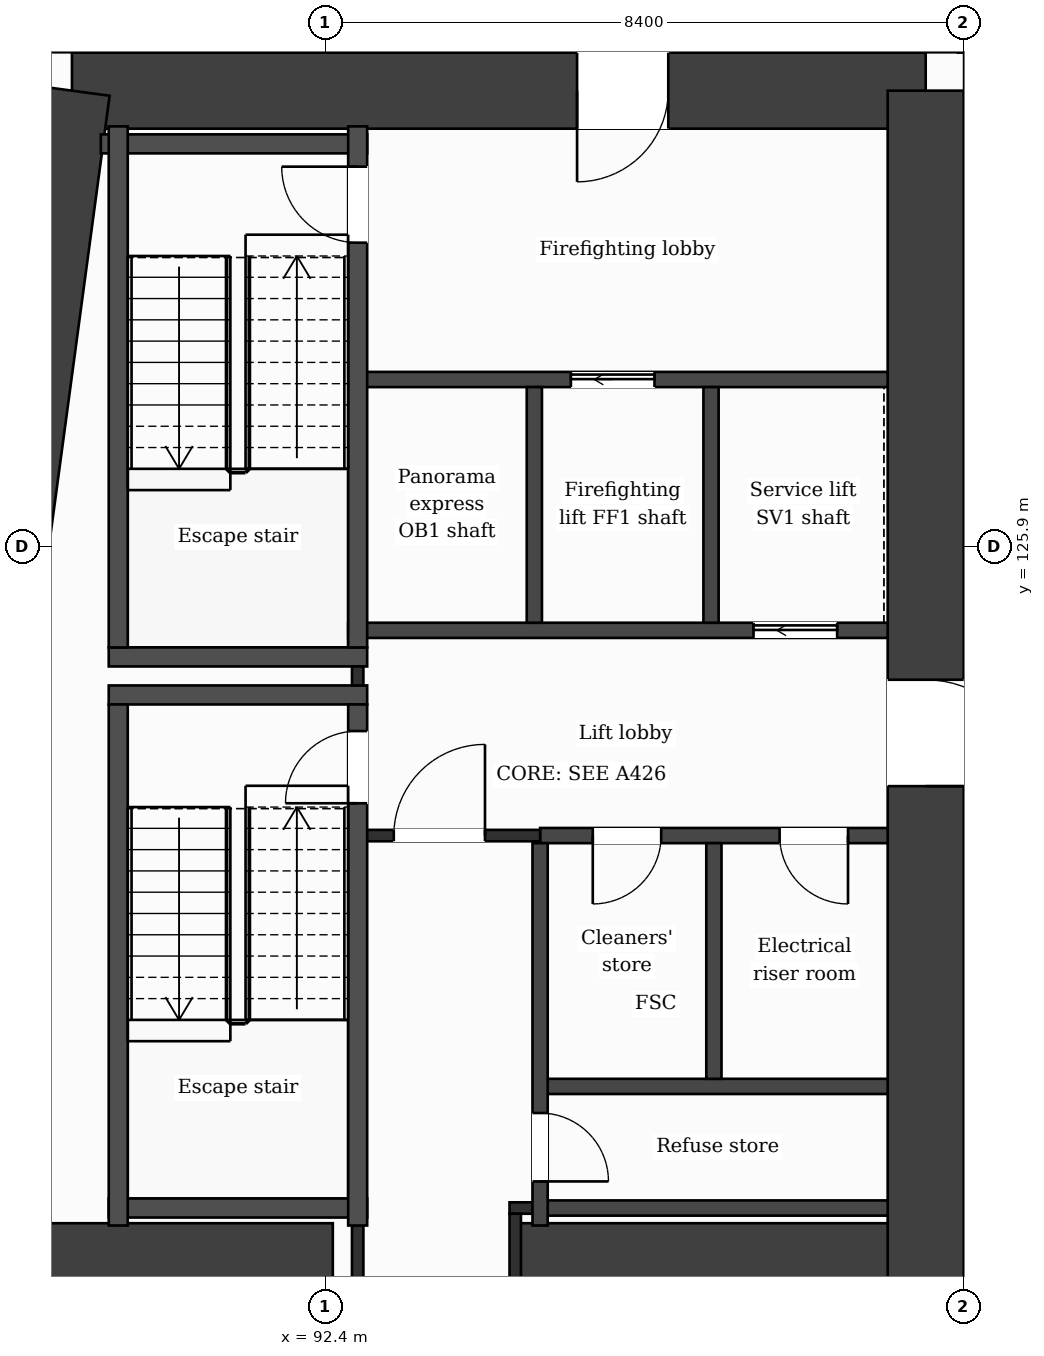
"""IFC4 building model, lengths in metres.
Left out: names, types, materials, properties, quantities, classifications, styles, units other than length and angle.
Written with IfcOpenShell. Run it as: python <this file> out.ifc"""

import sys

from ifc_helpers import new_model, si_unit, direction, frame, frame_2d, origin, place, context, subcontext, project, spatial, rectangle, extrude, element, fill, save


model = new_model("IFC4")
c1 = context("Model", 3, precision=1e-05, world=origin(), true_north=direction((0.0, 1.0)))
c2 = subcontext(c1, "Body", "Model", "MODEL_VIEW")
j1 = project(units=[si_unit("LENGTHUNIT", "METRE"), si_unit("PLANEANGLEUNIT", "RADIAN")], contexts=[c1])
p1 = place(None, origin())
s1 = spatial("IfcSite", under=j1, at=p1, CompositionType="ELEMENT")
p2 = place(p1, origin())
s2 = spatial("IfcBuilding", under=s1, at=p2, CompositionType="ELEMENT")
p3 = place(p2, frame((0.0, 0.0, 109.5)))
s3 = spatial("IfcBuildingStorey", under=s2, at=p3, CompositionType="ELEMENT", Elevation=109.5)
p4 = place(p3, frame((89.068, 131.9, 0.0), z_axis=(0.0, 0.0, 1.0), x_axis=(1.0, 0.0, 0.0)))
e1 = element("IfcWall", 1, at=p4, inside=s3, PredefinedType="SHEAR", context=c2, shape_type="SweptSolid", body=[
    extrude(rectangle(XDim=11.232, YDim=1.0, at=frame_2d((5.616, 0.0))), origin(), (0.0, 0.0, 1.0), 3.7),
])
p5 = place(p4, frame((6.646, 0.0, 0.0)))
e2 = element("IfcOpeningElement", 2, at=p5, cuts=e1, PredefinedType="OPENING", context=c2, shape_type="SweptSolid", body=[
    extrude(rectangle(XDim=1.2, YDim=2.1, at=frame_2d((0.6, 1.05))), frame((0.0, 0.51, 0.0), z_axis=(0.0, -1.0, 0.0), x_axis=(1.0, 0.0, 0.0)), (0.0, 0.0, 1.0), 1.02),
])
p6 = place(p3, frame((100.3, 131.9, 0.0), z_axis=(0.0, 0.0, 1.0), x_axis=(0.0, -1.0, 0.0)))
e3 = element("IfcWall", 3, at=p6, inside=s3, PredefinedType="SHEAR", context=c2, shape_type="SweptSolid", body=[
    extrude(rectangle(XDim=21.0, YDim=1.0, at=frame_2d((10.5, 0.0))), origin(), (0.0, 0.0, 1.0), 3.7),
])
p7 = place(p6, frame((7.75, 0.0, 0.0)))
e4 = element("IfcOpeningElement", 4, at=p7, cuts=e3, PredefinedType="OPENING", context=c2, shape_type="SweptSolid", body=[
    extrude(rectangle(XDim=1.4, YDim=2.1, at=frame_2d((0.7, 1.05))), frame((0.0, 0.51, 0.0), z_axis=(0.0, -1.0, 0.0), x_axis=(1.0, 0.0, 0.0)), (0.0, 0.0, 1.0), 1.02),
])
p8 = place(p3, frame((86.241, 110.9, 0.0), z_axis=(0.0, 0.0, 1.0), x_axis=(0.133411141623, 0.991060778808, 0.0)))
e5 = element("IfcWall", 5, at=p8, inside=s3, PredefinedType="SHEAR", context=c2, shape_type="SweptSolid", body=[
    extrude(rectangle(XDim=21.189, YDim=1.0, at=frame_2d((10.595, 0.0))), origin(), (0.0, 0.0, 1.0), 3.7),
])
p9 = place(p3, frame((87.423, 116.5, 0.0), z_axis=(0.0, 0.0, 1.0), x_axis=(1.0, 0.0, 0.0)))
e6 = element("IfcWall", 6, at=p9, inside=s3, PredefinedType="SHEAR", context=c2, shape_type="SweptSolid", body=[
    extrude(rectangle(XDim=5.077, YDim=1.0, at=frame_2d((2.539, 0.0))), origin(), (0.0, 0.0, 1.0), 3.7),
])
p10 = place(p3, frame((94.9, 116.5, 0.0), z_axis=(0.0, 0.0, 1.0), x_axis=(1.0, 0.0, 0.0)))
e7 = element("IfcWall", 7, at=p10, inside=s3, PredefinedType="SHEAR", context=c2, shape_type="SweptSolid", body=[
    extrude(rectangle(XDim=4.9, YDim=1.0, at=frame_2d((2.45, 0.0))), origin(), (0.0, 0.0, 1.0), 3.7),
])
p11 = place(p3, frame((91.177, 138.95, 0.0), z_axis=(0.0, 0.0, 1.0), x_axis=(-0.133426664613, -0.991058689065, 0.0)))
e8 = element("IfcWall", 8, at=p11, inside=s3, PredefinedType="SOLIDWALL", context=c2, shape_type="SweptSolid", body=[
    extrude(rectangle(XDim=6.609, YDim=0.3, at=frame_2d((3.305, 0.0))), origin(), (0.0, 0.0, 1.0), 3.38),
])
p12 = place(p11, frame((1.039, 0.0, 0.9)))
e9 = element("IfcOpeningElement", 9, at=p12, cuts=e8, PredefinedType="OPENING", context=c2, shape_type="SweptSolid", body=[
    extrude(rectangle(XDim=1.2, YDim=2.1, at=frame_2d((0.6, 1.05))), frame((0.0, 0.16, 0.0), z_axis=(0.0, -1.0, 0.0), x_axis=(1.0, 0.0, 0.0)), (0.0, 0.0, 1.0), 0.32),
])
p13 = place(p11, frame((4.294, 0.0, 0.0)))
e10 = element("IfcOpeningElement", 10, at=p13, cuts=e8, PredefinedType="OPENING", context=c2, shape_type="SweptSolid", body=[
    extrude(rectangle(XDim=1.2, YDim=2.4, at=frame_2d((0.6, 1.2))), frame((0.0, 0.16, 0.0), z_axis=(0.0, -1.0, 0.0), x_axis=(1.0, 0.0, 0.0)), (0.0, 0.0, 1.0), 0.32),
])
p14 = place(p3, frame((95.227, 117.2, 0.0), z_axis=(0.0, 0.0, 1.0), x_axis=(1.0, 0.0, 0.0)))
e11 = element("IfcWall", 11, at=p14, inside=s3, PredefinedType="PARTITIONING", context=c2, shape_type="SweptSolid", body=[
    extrude(rectangle(XDim=4.573, YDim=0.2, at=frame_2d((2.287, 0.0))), origin(), (0.0, 0.0, 1.0), 3.38),
])
p15 = place(p3, frame((94.825, 117.2, 0.0), z_axis=(0.0, 0.0, 1.0), x_axis=(1.0, 0.0, 0.0)))
e12 = element("IfcWall", 12, at=p15, inside=s3, PredefinedType="PARTITIONING", context=c2, shape_type="SweptSolid", body=[
    extrude(rectangle(XDim=0.402, YDim=0.15, at=frame_2d((0.201, 0.0))), origin(), (0.0, 0.0, 1.0), 3.38),
])
p16 = place(p3, frame((89.552, 117.2, 0.0), z_axis=(0.0, 0.0, 1.0), x_axis=(1.0, 0.0, 0.0)))
e13 = element("IfcWall", 13, at=p16, inside=s3, PredefinedType="PARTITIONING", context=c2, shape_type="SweptSolid", body=[
    extrude(rectangle(XDim=3.4, YDim=0.25, at=frame_2d((1.7, 0.0))), origin(), (0.0, 0.0, 1.0), 3.38),
])
p17 = place(p3, frame((95.227, 118.8, 0.0), z_axis=(0.0, 0.0, 1.0), x_axis=(1.0, 0.0, 0.0)))
e14 = element("IfcWall", 14, at=p17, inside=s3, PredefinedType="PARTITIONING", context=c2, shape_type="SweptSolid", body=[
    extrude(rectangle(XDim=4.573, YDim=0.2, at=frame_2d((2.287, 0.0))), origin(), (0.0, 0.0, 1.0), 3.38),
])
p18 = place(p3, frame((95.227, 122.1, 0.0), z_axis=(0.0, 0.0, 1.0), x_axis=(1.0, 0.0, 0.0)))
e15 = element("IfcWall", 15, at=p18, inside=s3, PredefinedType="PARTITIONING", context=c2, shape_type="SweptSolid", body=[
    extrude(rectangle(XDim=4.573, YDim=0.2, at=frame_2d((2.287, 0.0))), origin(), (0.0, 0.0, 1.0), 3.38),
])
p19 = place(p18, frame((0.693, 0.0, 0.0)))
e16 = element("IfcOpeningElement", 16, at=p19, cuts=e15, PredefinedType="OPENING", context=c2, shape_type="SweptSolid", body=[
    extrude(rectangle(XDim=0.9, YDim=2.1, at=frame_2d((0.45, 1.05))), frame((0.0, 0.11, 0.0), z_axis=(0.0, -1.0, 0.0), x_axis=(1.0, 0.0, 0.0)), (0.0, 0.0, 1.0), 0.22),
])
p20 = place(p18, frame((3.151, 0.0, 0.0)))
e17 = element("IfcOpeningElement", 17, at=p20, cuts=e15, PredefinedType="OPENING", context=c2, shape_type="SweptSolid", body=[
    extrude(rectangle(XDim=0.9, YDim=2.1, at=frame_2d((0.45, 1.05))), frame((0.0, 0.11, 0.0), z_axis=(0.0, -1.0, 0.0), x_axis=(1.0, 0.0, 0.0)), (0.0, 0.0, 1.0), 0.22),
])
p21 = place(p3, frame((92.827, 122.1, 0.0), z_axis=(0.0, 0.0, 1.0), x_axis=(1.0, 0.0, 0.0)))
e18 = element("IfcWall", 18, at=p21, inside=s3, PredefinedType="PARTITIONING", context=c2, shape_type="SweptSolid", body=[
    extrude(rectangle(XDim=2.4, YDim=0.15, at=frame_2d((1.2, 0.0))), origin(), (0.0, 0.0, 1.0), 3.38),
])
p22 = place(p21, frame((0.475, 0.0, 0.0)))
e19 = element("IfcOpeningElement", 19, at=p22, cuts=e18, PredefinedType="OPENING", context=c2, shape_type="SweptSolid", body=[
    extrude(rectangle(XDim=1.2, YDim=2.1, at=frame_2d((0.6, 1.05))), frame((0.0, 0.085, 0.0), z_axis=(0.0, -1.0, 0.0), x_axis=(1.0, 0.0, 0.0)), (0.0, 0.0, 1.0), 0.17),
])
for number, where, z_axis, x_axis in (
    (20, (89.552, 123.95, 0.0), (0.0, 0.0, 1.0), (1.0, 0.0, 0.0)),
    (21, (89.552, 124.45, 0.0), (0.0, 0.0, 1.0), (1.0, 0.0, 0.0)),
):
    element("IfcWall", number, at=place(p3, frame(where, z_axis=z_axis, x_axis=x_axis)), inside=s3, PredefinedType="PARTITIONING", context=c2, shape_type="SweptSolid", body=[
        extrude(rectangle(XDim=3.4, YDim=0.25, at=frame_2d((1.7, 0.0))), origin(), (0.0, 0.0, 1.0), 3.38),
    ])
p23 = place(p3, frame((92.702, 124.8, 0.0), z_axis=(0.0, 0.0, 1.0), x_axis=(1.0, 0.0, 0.0)))
e22 = element("IfcWall", 22, at=p23, inside=s3, PredefinedType="PARTITIONING", context=c2, shape_type="SweptSolid", body=[
    extrude(rectangle(XDim=7.098, YDim=0.2, at=frame_2d((3.549, 0.0))), origin(), (0.0, 0.0, 1.0), 3.38),
])
p24 = place(p23, frame((5.333, 0.0, 0.0)))
e23 = element("IfcOpeningElement", 23, at=p24, cuts=e22, PredefinedType="OPENING", context=c2, shape_type="SweptSolid", body=[
    extrude(rectangle(XDim=1.1, YDim=2.1, at=frame_2d((0.55, 1.05))), frame((0.0, 0.11, 0.0), z_axis=(0.0, -1.0, 0.0), x_axis=(1.0, 0.0, 0.0)), (0.0, 0.0, 1.0), 0.22),
])
p25 = place(p3, frame((92.827, 128.1, 0.0), z_axis=(0.0, 0.0, 1.0), x_axis=(1.0, 0.0, 0.0)))
e24 = element("IfcWall", 24, at=p25, inside=s3, PredefinedType="PARTITIONING", context=c2, shape_type="SweptSolid", body=[
    extrude(rectangle(XDim=6.973, YDim=0.2, at=frame_2d((3.487, 0.0))), origin(), (0.0, 0.0, 1.0), 3.38),
])
p26 = place(p25, frame((2.805, 0.0, 0.0)))
e25 = element("IfcOpeningElement", 25, at=p26, cuts=e24, PredefinedType="OPENING", context=c2, shape_type="SweptSolid", body=[
    extrude(rectangle(XDim=1.1, YDim=2.1, at=frame_2d((0.55, 1.05))), frame((0.0, 0.11, 0.0), z_axis=(0.0, -1.0, 0.0), x_axis=(1.0, 0.0, 0.0)), (0.0, 0.0, 1.0), 0.22),
])
p27 = place(p3, frame((89.448, 131.2, 0.0), z_axis=(0.0, 0.0, 1.0), x_axis=(1.0, 0.0, 0.0)))
e26 = element("IfcWall", 26, at=p27, inside=s3, PredefinedType="PARTITIONING", context=c2, shape_type="SweptSolid", body=[
    extrude(rectangle(XDim=3.504, YDim=0.25, at=frame_2d((1.752, 0.0))), origin(), (0.0, 0.0, 1.0), 3.38),
])
for number, where, z_axis, x_axis in (
    (27, (89.677, 116.97, 0.0), (0.0, 0.0, 1.0), (0.0, 1.0, 0.0)),
    (28, (89.677, 124.575, 0.0), (0.0, 0.0, 1.0), (0.0, 1.0, 0.0)),
):
    element("IfcWall", number, at=place(p3, frame(where, z_axis=z_axis, x_axis=x_axis)), inside=s3, PredefinedType="PARTITIONING", context=c2, shape_type="SweptSolid", body=[
        extrude(rectangle(XDim=6.855, YDim=0.25, at=frame_2d((3.427, 0.0))), origin(), (0.0, 0.0, 1.0), 3.38),
    ])
p28 = place(p3, frame((92.827, 116.0, 0.0), z_axis=(0.0, 0.0, 1.0), x_axis=(0.0, 1.0, 0.0)))
e29 = element("IfcWall", 29, at=p28, inside=s3, PredefinedType="PARTITIONING", context=c2, shape_type="SweptSolid", body=[
    extrude(rectangle(XDim=0.97, YDim=0.15, at=frame_2d((0.485, 0.0))), origin(), (0.0, 0.0, 1.0), 3.38),
])
p29 = place(p3, frame((92.827, 124.075, 0.0), z_axis=(0.0, 0.0, 1.0), x_axis=(0.0, 1.0, 0.0)))
e30 = element("IfcWall", 30, at=p29, inside=s3, PredefinedType="PARTITIONING", context=c2, shape_type="SweptSolid", body=[
    extrude(rectangle(XDim=0.25, YDim=0.15, at=frame_2d((0.125, 0.0))), origin(), (0.0, 0.0, 1.0), 3.38),
])
p30 = place(p3, frame((92.827, 116.97, 0.0), z_axis=(0.0, 0.0, 1.0), x_axis=(0.0, 1.0, 0.0)))
e31 = element("IfcWall", 31, at=p30, inside=s3, PredefinedType="PARTITIONING", context=c2, shape_type="SweptSolid", body=[
    extrude(rectangle(XDim=6.855, YDim=0.25, at=frame_2d((3.427, 0.0))), origin(), (0.0, 0.0, 1.0), 3.38),
])
p31 = place(p30, frame((5.555, 0.0, 0.0)))
e32 = element("IfcOpeningElement", 32, at=p31, cuts=e31, PredefinedType="OPENING", context=c2, shape_type="SweptSolid", body=[
    extrude(rectangle(XDim=0.95, YDim=2.1, at=frame_2d((0.475, 1.05))), frame((0.0, 0.135, 0.0), z_axis=(0.0, -1.0, 0.0), x_axis=(1.0, 0.0, 0.0)), (0.0, 0.0, 1.0), 0.27),
])
p32 = place(p3, frame((92.827, 124.575, 0.0), z_axis=(0.0, 0.0, 1.0), x_axis=(0.0, 1.0, 0.0)))
e33 = element("IfcWall", 33, at=p32, inside=s3, PredefinedType="PARTITIONING", context=c2, shape_type="SweptSolid", body=[
    extrude(rectangle(XDim=6.855, YDim=0.25, at=frame_2d((3.427, 0.0))), origin(), (0.0, 0.0, 1.0), 3.38),
])
p33 = place(p32, frame((5.325, 0.0, 0.0)))
e34 = element("IfcOpeningElement", 34, at=p33, cuts=e33, PredefinedType="OPENING", context=c2, shape_type="SweptSolid", body=[
    extrude(rectangle(XDim=1.0, YDim=2.1, at=frame_2d((0.5, 1.05))), frame((0.0, 0.135, 0.0), z_axis=(0.0, -1.0, 0.0), x_axis=(1.0, 0.0, 0.0)), (0.0, 0.0, 1.0), 0.27),
])
p34 = place(p3, frame((94.9, 116.0, 0.0), z_axis=(0.0, 0.0, 1.0), x_axis=(0.0, 1.0, 0.0)))
e35 = element("IfcWall", 35, at=p34, inside=s3, PredefinedType="PARTITIONING", context=c2, shape_type="SweptSolid", body=[
    extrude(rectangle(XDim=1.125, YDim=0.15, at=frame_2d((0.562, 0.0))), origin(), (0.0, 0.0, 1.0), 3.38),
])
p35 = place(p3, frame((95.151, 124.9, 0.0), z_axis=(0.0, 0.0, 1.0), x_axis=(0.0, 1.0, 0.0)))
e36 = element("IfcWall", 36, at=p35, inside=s3, PredefinedType="PARTITIONING", context=c2, shape_type="SweptSolid", body=[
    extrude(rectangle(XDim=3.1, YDim=0.2, at=frame_2d((1.55, 0.0))), origin(), (0.0, 0.0, 1.0), 3.38),
])
p36 = place(p3, frame((95.227, 116.97, 0.0), z_axis=(0.0, 0.0, 1.0), x_axis=(0.0, 1.0, 0.0)))
e37 = element("IfcWall", 37, at=p36, inside=s3, PredefinedType="PARTITIONING", context=c2, shape_type="SweptSolid", body=[
    extrude(rectangle(XDim=5.03, YDim=0.2, at=frame_2d((2.515, 0.0))), origin(), (0.0, 0.0, 1.0), 3.38),
])
p37 = place(p36, frame((0.58, 0.0, 0.0)))
e38 = element("IfcOpeningElement", 38, at=p37, cuts=e37, PredefinedType="OPENING", context=c2, shape_type="SweptSolid", body=[
    extrude(rectangle(XDim=0.9, YDim=2.1, at=frame_2d((0.45, 1.05))), frame((0.0, 0.11, 0.0), z_axis=(0.0, -1.0, 0.0), x_axis=(1.0, 0.0, 0.0)), (0.0, 0.0, 1.0), 0.22),
])
for number, where, z_axis, x_axis in (
    (39, (97.476, 124.9, 0.0), (0.0, 0.0, 1.0), (0.0, 1.0, 0.0)),
    (40, (97.513, 118.9, 0.0), (0.0, 0.0, 1.0), (0.0, 1.0, 0.0)),
):
    element("IfcWall", number, at=place(p3, frame(where, z_axis=z_axis, x_axis=x_axis)), inside=s3, PredefinedType="PARTITIONING", context=c2, shape_type="SweptSolid", body=[
        extrude(rectangle(XDim=3.1, YDim=0.2, at=frame_2d((1.55, 0.0))), origin(), (0.0, 0.0, 1.0), 3.38),
    ])
p38 = place(p22, origin())
e41 = element("IfcDoor", 41, at=p38, inside=s3, OperationType="SINGLE_SWING_RIGHT", PredefinedType="DOOR", context=c2, shape_type="SweptSolid", body=[
    extrude(rectangle(XDim=1.2, YDim=2.1, at=frame_2d((0.6, 1.05))), frame((0.0, 0.025, 0.0), z_axis=(0.0, -1.0, 0.0), x_axis=(1.0, 0.0, 0.0)), (0.0, 0.0, 1.0), 0.05),
])
fill(e19, e41)
p39 = place(p26, origin())
e42 = element("IfcDoor", 42, at=p39, inside=s3, OperationType="SLIDING_TO_LEFT", PredefinedType="DOOR", context=c2, shape_type="SweptSolid", body=[
    extrude(rectangle(XDim=1.1, YDim=2.1, at=frame_2d((0.55, 1.05))), frame((0.0, 0.025, 0.0), z_axis=(0.0, -1.0, 0.0), x_axis=(1.0, 0.0, 0.0)), (0.0, 0.0, 1.0), 0.05),
])
fill(e25, e42)
p40 = place(p24, origin())
e43 = element("IfcDoor", 43, at=p40, inside=s3, OperationType="SLIDING_TO_LEFT", PredefinedType="DOOR", context=c2, shape_type="SweptSolid", body=[
    extrude(rectangle(XDim=1.1, YDim=2.1, at=frame_2d((0.55, 1.05))), frame((0.0, 0.025, 0.0), z_axis=(0.0, -1.0, 0.0), x_axis=(1.0, 0.0, 0.0)), (0.0, 0.0, 1.0), 0.05),
])
fill(e23, e43)
p41 = place(p19, origin())
e44 = element("IfcDoor", 44, at=p41, inside=s3, OperationType="SINGLE_SWING_LEFT", PredefinedType="DOOR", context=c2, shape_type="SweptSolid", body=[
    extrude(rectangle(XDim=0.9, YDim=2.1, at=frame_2d((0.45, 1.05))), frame((0.0, 0.025, 0.0), z_axis=(0.0, -1.0, 0.0), x_axis=(1.0, 0.0, 0.0)), (0.0, 0.0, 1.0), 0.05),
])
fill(e16, e44)
p42 = place(p20, origin())
e45 = element("IfcDoor", 45, at=p42, inside=s3, OperationType="SINGLE_SWING_RIGHT", PredefinedType="DOOR", context=c2, shape_type="SweptSolid", body=[
    extrude(rectangle(XDim=0.9, YDim=2.1, at=frame_2d((0.45, 1.05))), frame((0.0, 0.025, 0.0), z_axis=(0.0, -1.0, 0.0), x_axis=(1.0, 0.0, 0.0)), (0.0, 0.0, 1.0), 0.05),
])
fill(e17, e45)
p43 = place(p31, origin())
e46 = element("IfcDoor", 46, at=p43, inside=s3, OperationType="SINGLE_SWING_LEFT", PredefinedType="DOOR", context=c2, shape_type="SweptSolid", body=[
    extrude(rectangle(XDim=0.95, YDim=2.1, at=frame_2d((0.475, 1.05))), frame((0.0, 0.025, 0.0), z_axis=(0.0, -1.0, 0.0), x_axis=(1.0, 0.0, 0.0)), (0.0, 0.0, 1.0), 0.05),
])
fill(e32, e46)
p44 = place(p33, origin())
e47 = element("IfcDoor", 47, at=p44, inside=s3, OperationType="SINGLE_SWING_RIGHT", PredefinedType="DOOR", context=c2, shape_type="SweptSolid", body=[
    extrude(rectangle(XDim=1.0, YDim=2.1, at=frame_2d((0.5, 1.05))), frame((0.0, 0.025, 0.0), z_axis=(0.0, -1.0, 0.0), x_axis=(1.0, 0.0, 0.0)), (0.0, 0.0, 1.0), 0.05),
])
fill(e34, e47)
p45 = place(p37, origin())
e48 = element("IfcDoor", 48, at=p45, inside=s3, OperationType="SINGLE_SWING_LEFT", PredefinedType="DOOR", context=c2, shape_type="SweptSolid", body=[
    extrude(rectangle(XDim=0.9, YDim=2.1, at=frame_2d((0.45, 1.05))), frame((0.0, 0.025, 0.0), z_axis=(0.0, -1.0, 0.0), x_axis=(1.0, 0.0, 0.0)), (0.0, 0.0, 1.0), 0.05),
])
fill(e38, e48)
p46 = place(p5, origin())
e49 = element("IfcDoor", 49, at=p46, inside=s3, OperationType="SINGLE_SWING_LEFT", PredefinedType="DOOR", context=c2, shape_type="SweptSolid", body=[
    extrude(rectangle(XDim=1.2, YDim=2.1, at=frame_2d((0.6, 1.05))), frame((0.0, 0.025, 0.0), z_axis=(0.0, -1.0, 0.0), x_axis=(1.0, 0.0, 0.0)), (0.0, 0.0, 1.0), 0.05),
])
fill(e2, e49)
p47 = place(p7, origin())
e50 = element("IfcDoor", 50, at=p47, inside=s3, OperationType="SINGLE_SWING_RIGHT", PredefinedType="DOOR", context=c2, shape_type="SweptSolid", body=[
    extrude(rectangle(XDim=1.4, YDim=2.1, at=frame_2d((0.7, 1.05))), frame((0.0, 0.025, 0.0), z_axis=(0.0, -1.0, 0.0), x_axis=(1.0, 0.0, 0.0)), (0.0, 0.0, 1.0), 0.05),
])
fill(e4, e50)
save(model, sys.argv[1])
